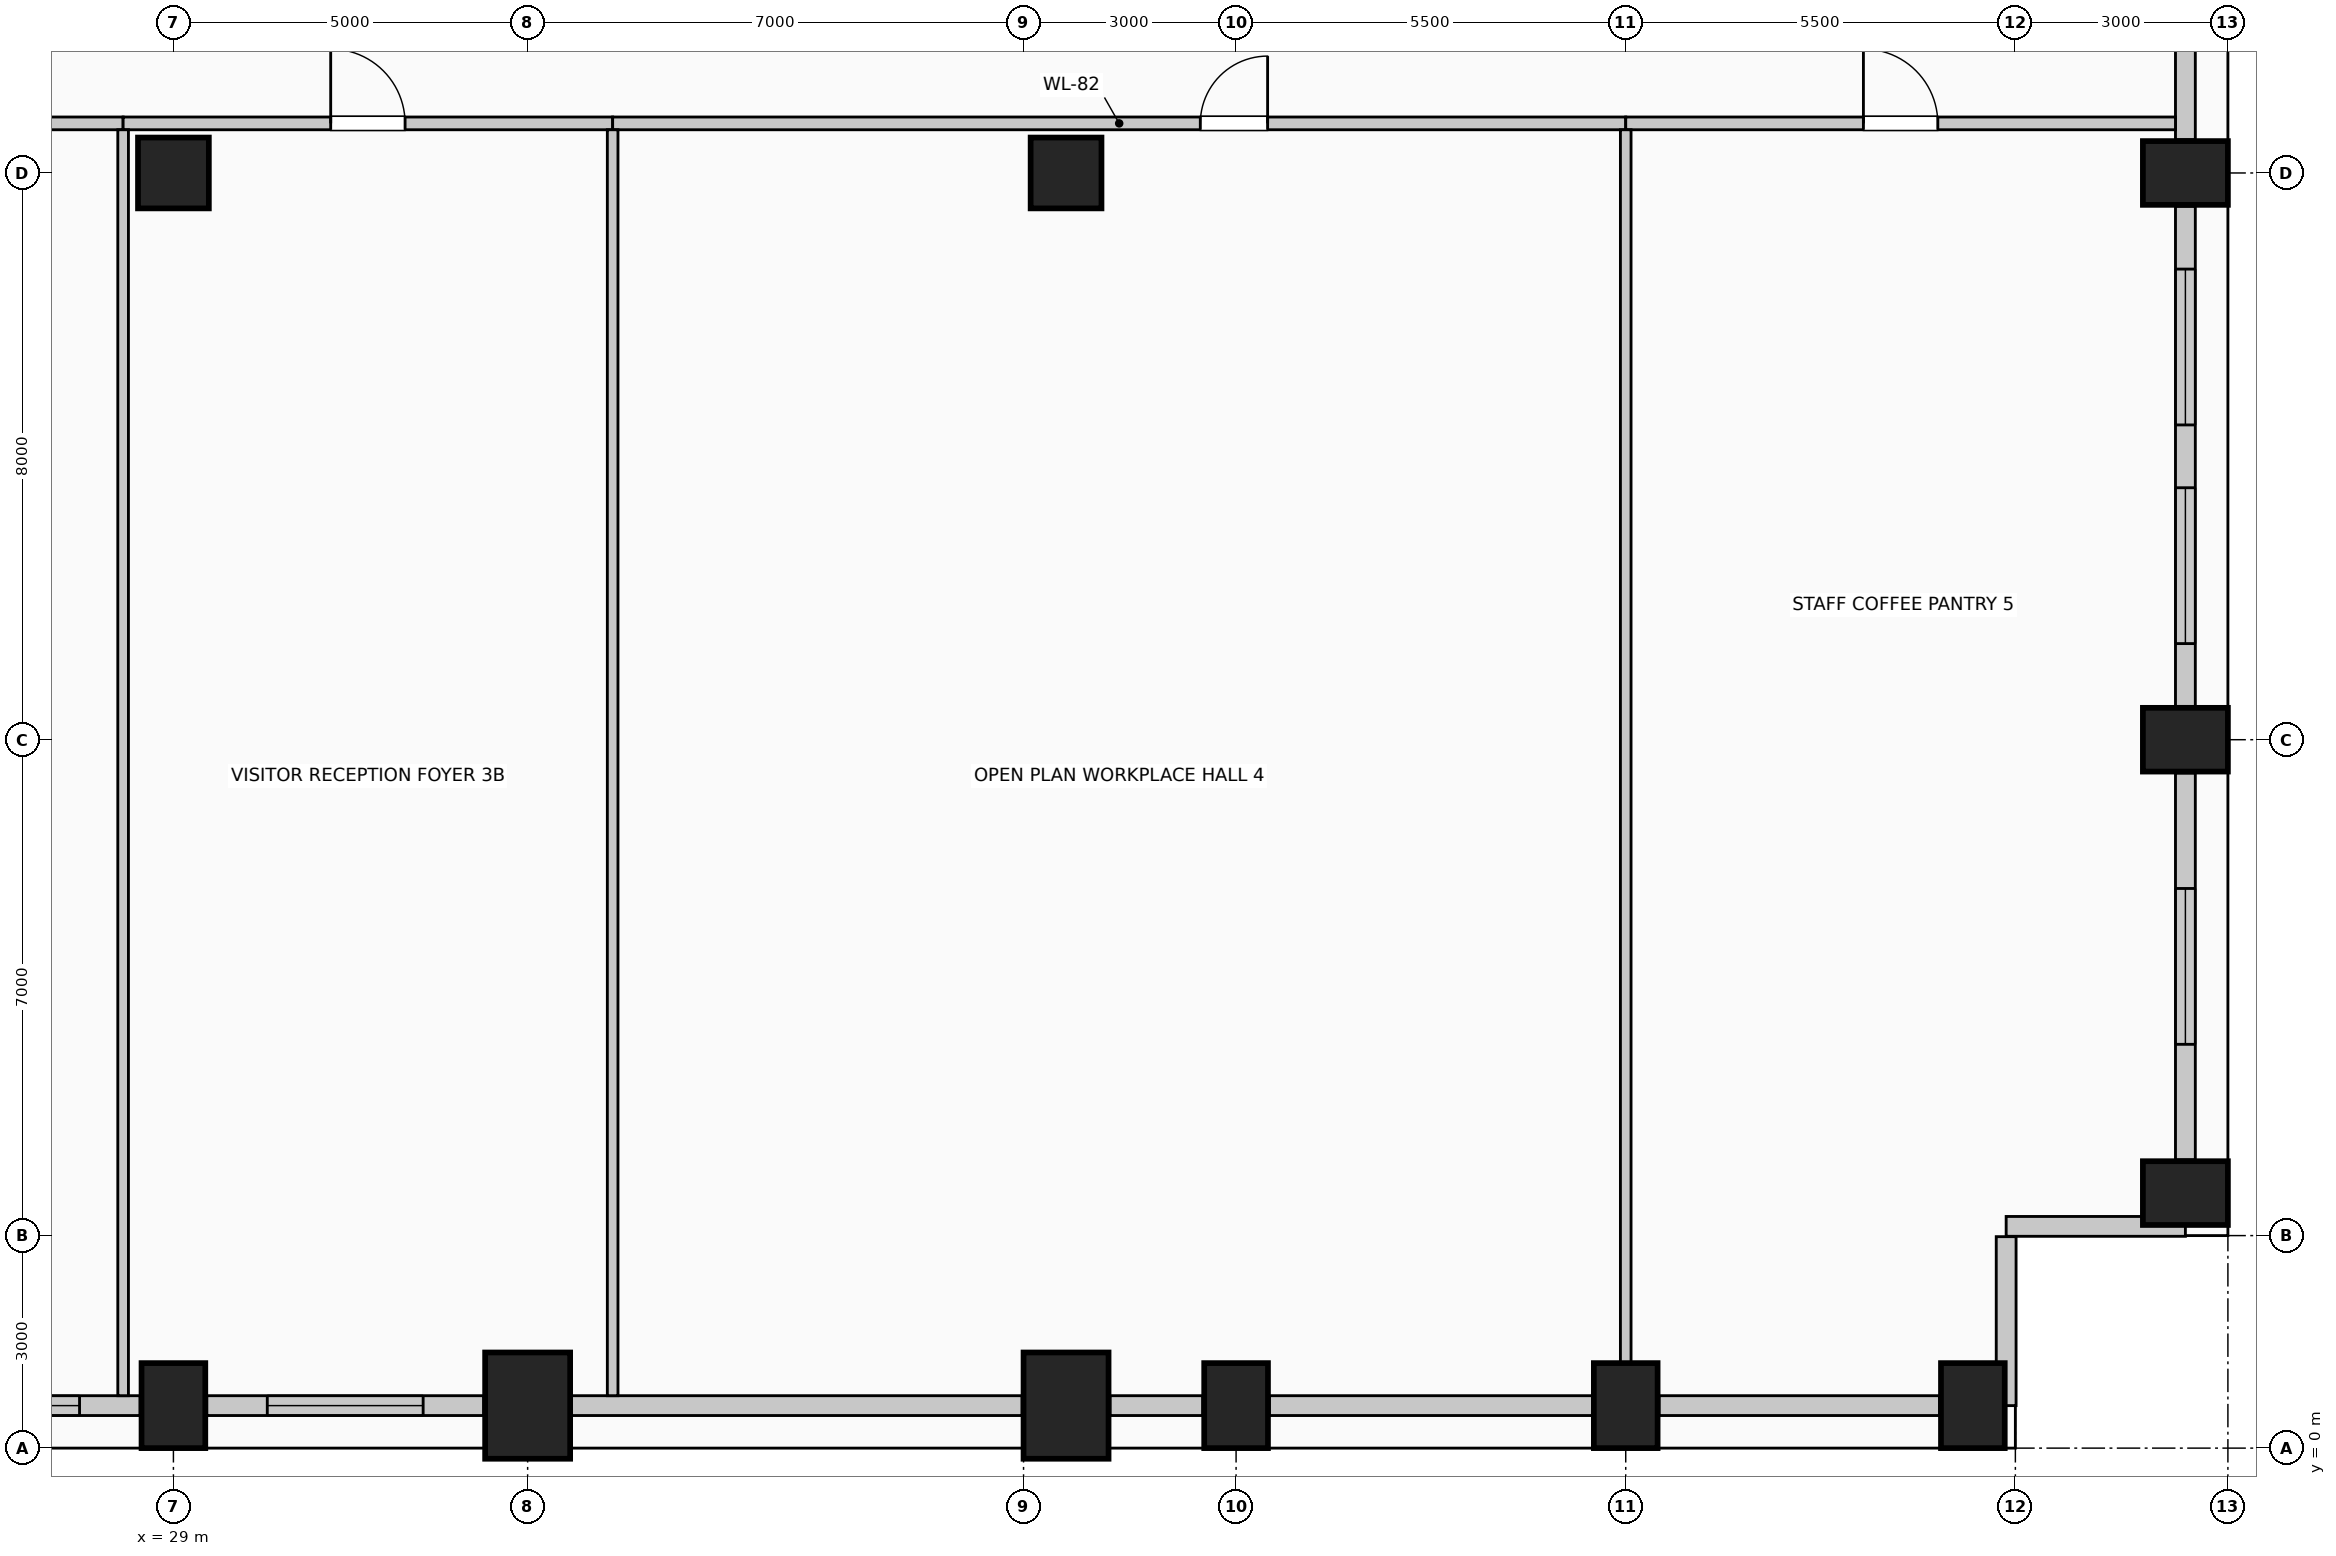
"""IFC4 building model, lengths in metres.
Left out: names, types, materials, properties, quantities, classifications, styles, units other than length and angle.
Written with IfcOpenShell. Run it as: python <this file> out.ifc"""

import sys

from ifc_helpers import new_model, si_unit, direction, frame, frame_2d, origin, origin_2d, place, context, subcontext, project, spatial, rectangle, circle, extrude, element, fill, save


model = new_model("IFC4")
c1 = context("Model", 3, precision=1e-05, world=origin(), true_north=direction((0.0, 1.0)))
c2 = subcontext(c1, "Body", "Model", "MODEL_VIEW")
j1 = project(units=[si_unit("LENGTHUNIT", "METRE"), si_unit("PLANEANGLEUNIT", "RADIAN")], contexts=[c1])
p1 = place(None, origin())
s1 = spatial("IfcSite", under=j1, at=p1, CompositionType="ELEMENT")
p2 = place(p1, origin())
s2 = spatial("IfcBuilding", under=s1, at=p2, CompositionType="ELEMENT")
p3 = place(p2, frame((0.0, 0.0, 74.6)))
s3 = spatial("IfcBuildingStorey", under=s2, at=p3, CompositionType="ELEMENT", Elevation=74.6)
p4 = place(p3, frame((29.0, 0.6, 0.0), z_axis=(0.0, 0.0, 1.0), x_axis=(1.0, 0.0, 0.0)))
e1 = element("IfcColumn", 1, at=p4, inside=s3, PredefinedType="COLUMN", context=c2, shape_type="SweptSolid", body=[
    extrude(rectangle(XDim=0.9, YDim=1.2, at=origin_2d()), origin(), (0.0, 0.0, 1.0), 4.0),
])
for number, where, z_axis, x_axis in (
    (2, (34.0, 0.6, 0.0), (0.0, 0.0, 1.0), (1.0, 0.0, 0.0)),
    (3, (41.6, 0.6, 0.0), (0.0, 0.0, 1.0), (1.0, 0.0, 0.0)),
):
    element("IfcColumn", number, at=place(p3, frame(where, z_axis=z_axis, x_axis=x_axis)), inside=s3, PredefinedType="COLUMN", context=c2, shape_type="SweptSolid", body=[
        extrude(rectangle(XDim=1.2, YDim=1.5, at=origin_2d()), origin(), (0.0, 0.0, 1.0), 4.0),
    ])
for number, where, z_axis, x_axis in (
    (4, (44.0, 0.6, 0.0), (0.0, 0.0, 1.0), (1.0, 0.0, 0.0)),
    (5, (49.5, 0.6, 0.0), (0.0, 0.0, 1.0), (1.0, 0.0, 0.0)),
    (6, (54.4, 0.6, 0.0), (0.0, 0.0, 1.0), (1.0, 0.0, 0.0)),
    (7, (57.4, 3.6, 0.0), (0.0, 0.0, 1.0), (0.0, 1.0, 0.0)),
    (8, (57.4, 10.0, 0.0), (0.0, 0.0, 1.0), (0.0, 1.0, 0.0)),
    (9, (57.4, 18.0, 0.0), (0.0, 0.0, 1.0), (0.0, 1.0, 0.0)),
):
    element("IfcColumn", number, at=place(p3, frame(where, z_axis=z_axis, x_axis=x_axis)), inside=s3, PredefinedType="COLUMN", context=c2, shape_type="SweptSolid", body=[
        extrude(rectangle(XDim=0.9, YDim=1.2, at=origin_2d()), origin(), (0.0, 0.0, 1.0), 4.0),
    ])
for number, where, z_axis, x_axis in (
    (10, (29.0, 18.0, 0.0), (0.0, 0.0, 1.0), (1.0, 0.0, 0.0)),
    (11, (41.6, 18.0, 0.0), (0.0, 0.0, 1.0), (1.0, 0.0, 0.0)),
):
    element("IfcColumn", number, at=place(p3, frame(where, z_axis=z_axis, x_axis=x_axis)), inside=s3, PredefinedType="COLUMN", context=c2, shape_type="SweptSolid", body=[
        extrude(circle(Radius=0.5, at=origin_2d()), origin(), (0.0, 0.0, 1.0), 4.0),
    ])
p5 = place(p3, frame((28.53, 0.6, 0.0), z_axis=(0.0, 0.0, 1.0), x_axis=(-1.0, 0.0, 0.0)))
e12 = element("IfcWall", 12, at=p5, inside=s3, PredefinedType="SOLIDWALL", context=c2, shape_type="SweptSolid", body=[
    extrude(rectangle(XDim=3.91, YDim=0.28, at=frame_2d((1.955, 0.0))), origin(), (0.0, 0.0, 1.0), 2.85),
])
p6 = place(p5, frame((0.855, 0.0, 0.5)))
e13 = element("IfcOpeningElement", 13, at=p6, cuts=e12, PredefinedType="OPENING", context=c2, shape_type="SweptSolid", body=[
    extrude(rectangle(XDim=2.2, YDim=1.95, at=frame_2d((1.1, 0.975))), frame((0.0, 0.15, 0.0), z_axis=(0.0, -1.0, 0.0), x_axis=(1.0, 0.0, 0.0)), (0.0, 0.0, 1.0), 0.3),
])
p7 = place(p3, frame((33.38, 0.6, 0.0), z_axis=(0.0, 0.0, 1.0), x_axis=(-1.0, 0.0, 0.0)))
e14 = element("IfcWall", 14, at=p7, inside=s3, PredefinedType="SOLIDWALL", context=c2, shape_type="SweptSolid", body=[
    extrude(rectangle(XDim=3.91, YDim=0.28, at=frame_2d((1.955, 0.0))), origin(), (0.0, 0.0, 1.0), 2.85),
])
p8 = place(p7, frame((0.855, 0.0, 0.5)))
e15 = element("IfcOpeningElement", 15, at=p8, cuts=e14, PredefinedType="OPENING", context=c2, shape_type="SweptSolid", body=[
    extrude(rectangle(XDim=2.2, YDim=1.95, at=frame_2d((1.1, 0.975))), frame((0.0, 0.15, 0.0), z_axis=(0.0, -1.0, 0.0), x_axis=(1.0, 0.0, 0.0)), (0.0, 0.0, 1.0), 0.3),
])
p9 = place(p3, frame((40.98, 0.6, 0.0), z_axis=(0.0, 0.0, 1.0), x_axis=(-1.0, 0.0, 0.0)))
e16 = element("IfcWall", 16, at=p9, inside=s3, PredefinedType="SOLIDWALL", context=c2, shape_type="SweptSolid", body=[
    extrude(rectangle(XDim=6.36, YDim=0.28, at=frame_2d((3.18, 0.0))), origin(), (0.0, 0.0, 1.0), 2.85),
])
p10 = place(p3, frame((43.53, 0.6, 0.0), z_axis=(0.0, 0.0, 1.0), x_axis=(-1.0, 0.0, 0.0)))
e17 = element("IfcWall", 17, at=p10, inside=s3, PredefinedType="SOLIDWALL", context=c2, shape_type="SweptSolid", body=[
    extrude(rectangle(XDim=1.31, YDim=0.28, at=frame_2d((0.655, 0.0))), origin(), (0.0, 0.0, 1.0), 2.85),
])
p11 = place(p3, frame((49.03, 0.6, 0.0), z_axis=(0.0, 0.0, 1.0), x_axis=(-1.0, 0.0, 0.0)))
e18 = element("IfcWall", 18, at=p11, inside=s3, PredefinedType="SOLIDWALL", context=c2, shape_type="SweptSolid", body=[
    extrude(rectangle(XDim=4.56, YDim=0.28, at=frame_2d((2.28, 0.0))), origin(), (0.0, 0.0, 1.0), 2.85),
])
p12 = place(p3, frame((53.93, 0.6, 0.0), z_axis=(0.0, 0.0, 1.0), x_axis=(-1.0, 0.0, 0.0)))
e19 = element("IfcWall", 19, at=p12, inside=s3, PredefinedType="SOLIDWALL", context=c2, shape_type="SweptSolid", body=[
    extrude(rectangle(XDim=3.96, YDim=0.28, at=frame_2d((1.98, 0.0))), origin(), (0.0, 0.0, 1.0), 2.85),
])
p13 = place(p3, frame((57.4, 9.53, 0.0), z_axis=(0.0, 0.0, 1.0), x_axis=(0.0, -1.0, 0.0)))
e20 = element("IfcWall", 20, at=p13, inside=s3, PredefinedType="SOLIDWALL", context=c2, shape_type="SweptSolid", body=[
    extrude(rectangle(XDim=5.46, YDim=0.28, at=frame_2d((2.73, 0.0))), origin(), (0.0, 0.0, 1.0), 2.85),
])
p14 = place(p13, frame((1.63, 0.0, 0.5)))
e21 = element("IfcOpeningElement", 21, at=p14, cuts=e20, PredefinedType="OPENING", context=c2, shape_type="SweptSolid", body=[
    extrude(rectangle(XDim=2.2, YDim=1.95, at=frame_2d((1.1, 0.975))), frame((0.0, 0.15, 0.0), z_axis=(0.0, -1.0, 0.0), x_axis=(1.0, 0.0, 0.0)), (0.0, 0.0, 1.0), 0.3),
])
p15 = place(p3, frame((57.4, 17.53, 0.0), z_axis=(0.0, 0.0, 1.0), x_axis=(0.0, -1.0, 0.0)))
e22 = element("IfcWall", 22, at=p15, inside=s3, PredefinedType="SOLIDWALL", context=c2, shape_type="SweptSolid", body=[
    extrude(rectangle(XDim=7.06, YDim=0.28, at=frame_2d((3.53, 0.0))), origin(), (0.0, 0.0, 1.0), 2.85),
])
p16 = place(p15, frame((0.887, 0.0, 0.5)))
e23 = element("IfcOpeningElement", 23, at=p16, cuts=e22, PredefinedType="OPENING", context=c2, shape_type="SweptSolid", body=[
    extrude(rectangle(XDim=2.2, YDim=1.95, at=frame_2d((1.1, 0.975))), frame((0.0, 0.15, 0.0), z_axis=(0.0, -1.0, 0.0), x_axis=(1.0, 0.0, 0.0)), (0.0, 0.0, 1.0), 0.3),
])
p17 = place(p15, frame((3.973, 0.0, 0.5)))
e24 = element("IfcOpeningElement", 24, at=p17, cuts=e22, PredefinedType="OPENING", context=c2, shape_type="SweptSolid", body=[
    extrude(rectangle(XDim=2.2, YDim=1.95, at=frame_2d((1.1, 0.975))), frame((0.0, 0.15, 0.0), z_axis=(0.0, -1.0, 0.0), x_axis=(1.0, 0.0, 0.0)), (0.0, 0.0, 1.0), 0.3),
])
p18 = place(p3, frame((57.4, 25.53, 0.0), z_axis=(0.0, 0.0, 1.0), x_axis=(0.0, -1.0, 0.0)))
e25 = element("IfcWall", 25, at=p18, inside=s3, PredefinedType="SOLIDWALL", context=c2, shape_type="SweptSolid", body=[
    extrude(rectangle(XDim=7.06, YDim=0.28, at=frame_2d((3.53, 0.0))), origin(), (0.0, 0.0, 1.0), 2.85),
])
p19 = place(p3, frame((57.4, 3.13, 0.0), z_axis=(0.0, 0.0, 1.0), x_axis=(-1.0, 0.0, 0.0)))
e26 = element("IfcWall", 26, at=p19, inside=s3, PredefinedType="SOLIDWALL", context=c2, shape_type="SweptSolid", body=[
    extrude(rectangle(XDim=2.53, YDim=0.28, at=frame_2d((1.265, 0.0))), origin(), (0.0, 0.0, 1.0), 3.7),
])
p20 = place(p3, frame((54.87, 2.985, 0.0), z_axis=(0.0, 0.0, 1.0), x_axis=(0.0, -1.0, 0.0)))
e27 = element("IfcWall", 27, at=p20, inside=s3, PredefinedType="SOLIDWALL", context=c2, shape_type="SweptSolid", body=[
    extrude(rectangle(XDim=2.385, YDim=0.28, at=frame_2d((1.192, 0.0))), origin(), (0.0, 0.0, 1.0), 3.7),
])
p21 = place(p3, frame((22.4, 18.7, 0.0), z_axis=(0.0, 0.0, 1.0), x_axis=(1.0, 0.0, 0.0)))
e28 = element("IfcWall", 28, at=p21, inside=s3, PredefinedType="PARTITIONING", context=c2, shape_type="SweptSolid", body=[
    extrude(rectangle(XDim=5.89, YDim=0.18, at=frame_2d((2.945, 0.0))), origin(), (0.0, 0.0, 1.0), 3.7),
])
p22 = place(p21, frame((2.47, 0.0, 0.0)))
e29 = element("IfcOpeningElement", 29, at=p22, cuts=e28, PredefinedType="OPENING", context=c2, shape_type="SweptSolid", body=[
    extrude(rectangle(XDim=0.95, YDim=2.15, at=frame_2d((0.475, 1.075))), frame((0.0, 0.1, 0.0), z_axis=(0.0, -1.0, 0.0), x_axis=(1.0, 0.0, 0.0)), (0.0, 0.0, 1.0), 0.2),
])
p23 = place(p3, frame((28.29, 18.7, 0.0), z_axis=(0.0, 0.0, 1.0), x_axis=(1.0, 0.0, 0.0)))
e30 = element("IfcWall", 30, at=p23, inside=s3, PredefinedType="PARTITIONING", context=c2, shape_type="SweptSolid", body=[
    extrude(rectangle(XDim=6.91, YDim=0.18, at=frame_2d((3.455, 0.0))), origin(), (0.0, 0.0, 1.0), 3.7),
])
p24 = place(p23, frame((2.93, 0.0, 0.0)))
e31 = element("IfcOpeningElement", 31, at=p24, cuts=e30, PredefinedType="OPENING", context=c2, shape_type="SweptSolid", body=[
    extrude(rectangle(XDim=1.05, YDim=2.15, at=frame_2d((0.525, 1.075))), frame((0.0, 0.1, 0.0), z_axis=(0.0, -1.0, 0.0), x_axis=(1.0, 0.0, 0.0)), (0.0, 0.0, 1.0), 0.2),
])
p25 = place(p3, frame((35.2, 18.7, 0.0), z_axis=(0.0, 0.0, 1.0), x_axis=(1.0, 0.0, 0.0)))
e32 = element("IfcWall", 32, at=p25, inside=s3, PredefinedType="PARTITIONING", context=c2, shape_type="SweptSolid", body=[
    extrude(rectangle(XDim=14.3, YDim=0.18, at=frame_2d((7.15, 0.0))), origin(), (0.0, 0.0, 1.0), 3.7),
])
p26 = place(p25, frame((8.295, 0.0, 0.0)))
e33 = element("IfcOpeningElement", 33, at=p26, cuts=e32, PredefinedType="OPENING", context=c2, shape_type="SweptSolid", body=[
    extrude(rectangle(XDim=0.95, YDim=2.15, at=frame_2d((0.475, 1.075))), frame((0.0, 0.1, 0.0), z_axis=(0.0, -1.0, 0.0), x_axis=(1.0, 0.0, 0.0)), (0.0, 0.0, 1.0), 0.2),
])
p27 = place(p3, frame((49.5, 18.7, 0.0), z_axis=(0.0, 0.0, 1.0), x_axis=(1.0, 0.0, 0.0)))
e34 = element("IfcWall", 34, at=p27, inside=s3, PredefinedType="PARTITIONING", context=c2, shape_type="SweptSolid", body=[
    extrude(rectangle(XDim=7.76, YDim=0.18, at=frame_2d((3.88, 0.0))), origin(), (0.0, 0.0, 1.0), 3.7),
])
p28 = place(p27, frame((3.355, 0.0, 0.0)))
e35 = element("IfcOpeningElement", 35, at=p28, cuts=e34, PredefinedType="OPENING", context=c2, shape_type="SweptSolid", body=[
    extrude(rectangle(XDim=1.05, YDim=2.15, at=frame_2d((0.525, 1.075))), frame((0.0, 0.1, 0.0), z_axis=(0.0, -1.0, 0.0), x_axis=(1.0, 0.0, 0.0)), (0.0, 0.0, 1.0), 0.2),
])
for number, where, z_axis, x_axis in (
    (36, (28.29, 0.74, 0.0), (0.0, 0.0, 1.0), (0.0, 1.0, 0.0)),
    (37, (35.2, 0.74, 0.0), (0.0, 0.0, 1.0), (0.0, 1.0, 0.0)),
):
    element("IfcWall", number, at=place(p3, frame(where, z_axis=z_axis, x_axis=x_axis)), inside=s3, PredefinedType="PARTITIONING", context=c2, shape_type="SweptSolid", body=[
        extrude(rectangle(XDim=17.87, YDim=0.15, at=frame_2d((8.935, 0.0))), origin(), (0.0, 0.0, 1.0), 3.7),
    ])
p29 = place(p3, frame((49.5, 1.2, 0.0), z_axis=(0.0, 0.0, 1.0), x_axis=(0.0, 1.0, 0.0)))
e38 = element("IfcWall", 38, at=p29, inside=s3, PredefinedType="PARTITIONING", context=c2, shape_type="SweptSolid", body=[
    extrude(rectangle(XDim=17.41, YDim=0.15, at=frame_2d((8.705, 0.0))), origin(), (0.0, 0.0, 1.0), 3.7),
])
p30 = place(p6, origin())
e39 = element("IfcWindow", 39, at=p30, inside=s3, PartitioningType="SINGLE_PANEL", PredefinedType="WINDOW", context=c2, shape_type="SweptSolid", body=[
    extrude(rectangle(XDim=2.2, YDim=1.95, at=frame_2d((1.1, 0.975))), frame((0.0, 0.03, 0.0), z_axis=(0.0, -1.0, 0.0), x_axis=(1.0, 0.0, 0.0)), (0.0, 0.0, 1.0), 0.06),
])
fill(e13, e39)
p31 = place(p8, origin())
e40 = element("IfcWindow", 40, at=p31, inside=s3, PartitioningType="SINGLE_PANEL", PredefinedType="WINDOW", context=c2, shape_type="SweptSolid", body=[
    extrude(rectangle(XDim=2.2, YDim=1.95, at=frame_2d((1.1, 0.975))), frame((0.0, 0.03, 0.0), z_axis=(0.0, -1.0, 0.0), x_axis=(1.0, 0.0, 0.0)), (0.0, 0.0, 1.0), 0.06),
])
fill(e15, e40)
p32 = place(p14, origin())
e41 = element("IfcWindow", 41, at=p32, inside=s3, PartitioningType="SINGLE_PANEL", PredefinedType="WINDOW", context=c2, shape_type="SweptSolid", body=[
    extrude(rectangle(XDim=2.2, YDim=1.95, at=frame_2d((1.1, 0.975))), frame((0.0, 0.03, 0.0), z_axis=(0.0, -1.0, 0.0), x_axis=(1.0, 0.0, 0.0)), (0.0, 0.0, 1.0), 0.06),
])
fill(e21, e41)
p33 = place(p16, origin())
e42 = element("IfcWindow", 42, at=p33, inside=s3, PartitioningType="SINGLE_PANEL", PredefinedType="WINDOW", context=c2, shape_type="SweptSolid", body=[
    extrude(rectangle(XDim=2.2, YDim=1.95, at=frame_2d((1.1, 0.975))), frame((0.0, 0.03, 0.0), z_axis=(0.0, -1.0, 0.0), x_axis=(1.0, 0.0, 0.0)), (0.0, 0.0, 1.0), 0.06),
])
fill(e23, e42)
p34 = place(p17, origin())
e43 = element("IfcWindow", 43, at=p34, inside=s3, PartitioningType="SINGLE_PANEL", PredefinedType="WINDOW", context=c2, shape_type="SweptSolid", body=[
    extrude(rectangle(XDim=2.2, YDim=1.95, at=frame_2d((1.1, 0.975))), frame((0.0, 0.03, 0.0), z_axis=(0.0, -1.0, 0.0), x_axis=(1.0, 0.0, 0.0)), (0.0, 0.0, 1.0), 0.06),
])
fill(e24, e43)
p35 = place(p24, origin())
e44 = element("IfcDoor", 44, at=p35, inside=s3, OperationType="SINGLE_SWING_LEFT", PredefinedType="DOOR", context=c2, shape_type="SweptSolid", body=[
    extrude(rectangle(XDim=1.05, YDim=2.15, at=frame_2d((0.525, 1.075))), frame((0.0, 0.025, 0.0), z_axis=(0.0, -1.0, 0.0), x_axis=(1.0, 0.0, 0.0)), (0.0, 0.0, 1.0), 0.05),
])
fill(e31, e44)
p36 = place(p26, origin())
e45 = element("IfcDoor", 45, at=p36, inside=s3, OperationType="SINGLE_SWING_RIGHT", PredefinedType="DOOR", context=c2, shape_type="SweptSolid", body=[
    extrude(rectangle(XDim=0.95, YDim=2.15, at=frame_2d((0.475, 1.075))), frame((0.0, 0.025, 0.0), z_axis=(0.0, -1.0, 0.0), x_axis=(1.0, 0.0, 0.0)), (0.0, 0.0, 1.0), 0.05),
])
fill(e33, e45)
p37 = place(p28, origin())
e46 = element("IfcDoor", 46, at=p37, inside=s3, OperationType="SINGLE_SWING_LEFT", PredefinedType="DOOR", context=c2, shape_type="SweptSolid", body=[
    extrude(rectangle(XDim=1.05, YDim=2.15, at=frame_2d((0.525, 1.075))), frame((0.0, 0.025, 0.0), z_axis=(0.0, -1.0, 0.0), x_axis=(1.0, 0.0, 0.0)), (0.0, 0.0, 1.0), 0.05),
])
fill(e35, e46)
save(model, sys.argv[1])
